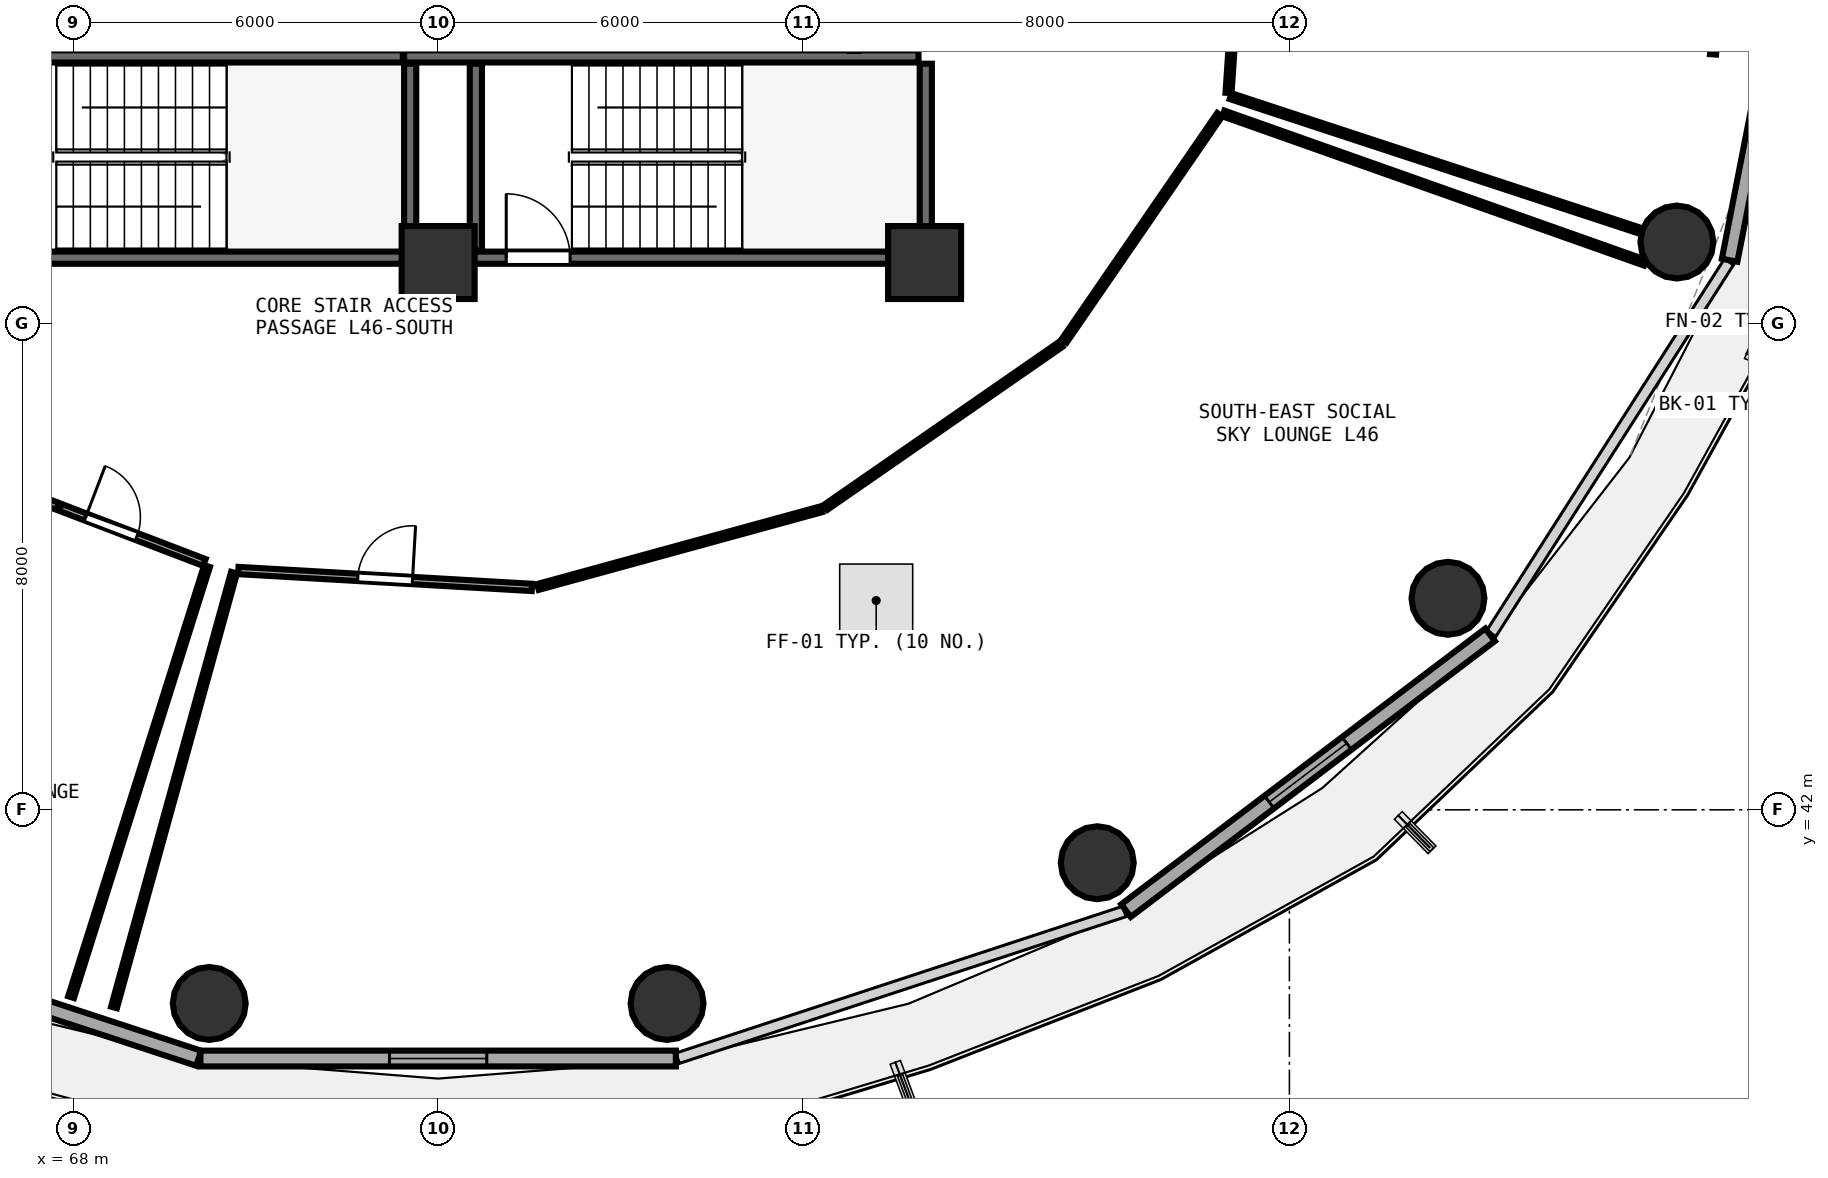
"""IFC4 building model, lengths in metres.
Left out: names, types, materials, properties, quantities, classifications, styles, units other than length and angle.
Written with IfcOpenShell. Run it as: python <this file> out.ifc"""

import sys

from ifc_helpers import new_model, si_unit, direction, frame, frame_2d, origin, origin_2d, place, context, subcontext, project, spatial, rectangle, circle, extrude, element, fill, save


model = new_model("IFC4")
c1 = context("Model", 3, precision=1e-05, world=origin(), true_north=direction((0.0, 1.0)))
c2 = subcontext(c1, "Body", "Model", "MODEL_VIEW")
j1 = project(units=[si_unit("LENGTHUNIT", "METRE"), si_unit("PLANEANGLEUNIT", "RADIAN")], contexts=[c1])
p1 = place(None, origin())
s1 = spatial("IfcSite", under=j1, at=p1, CompositionType="ELEMENT")
p2 = place(p1, origin())
s2 = spatial("IfcBuilding", under=s1, at=p2, CompositionType="ELEMENT")
p3 = place(p2, frame((0.0, 0.0, 180.6)))
s3 = spatial("IfcBuildingStorey", under=s2, at=p3, CompositionType="ELEMENT", Elevation=180.6)
for number, where, z_axis, x_axis in (
    (1, (74.0, 51.0, 0.0), (0.0, 0.0, 1.0), (1.0, 0.0, 0.0)),
    (2, (82.0, 51.0, 0.0), (0.0, 0.0, 1.0), (1.0, 0.0, 0.0)),
):
    element("IfcColumn", number, at=place(p3, frame(where, z_axis=z_axis, x_axis=x_axis)), inside=s3, PredefinedType="PILASTER", context=c2, shape_type="SweptSolid", body=[
        extrude(rectangle(XDim=1.2, YDim=1.2, at=origin_2d()), origin(), (0.0, 0.0, 1.0), 3.75),
    ])
for number, where, z_axis, x_axis in (
    (3, (70.235, 38.816, 0.0), (0.0, 0.0, 1.0), (1.0, 0.0, 0.0)),
    (4, (77.765, 38.816, 0.0), (0.0, 0.0, 1.0), (1.0, 0.0, 0.0)),
    (5, (84.84, 41.13, 0.0), (0.0, 0.0, 1.0), (1.0, 0.0, 0.0)),
    (6, (90.608, 45.479, 0.0), (0.0, 0.0, 1.0), (1.0, 0.0, 0.0)),
    (7, (94.373, 51.337, 0.0), (0.0, 0.0, 1.0), (1.0, 0.0, 0.0)),
):
    element("IfcColumn", number, at=place(p3, frame(where, z_axis=z_axis, x_axis=x_axis)), inside=s3, PredefinedType="COLUMN", context=c2, shape_type="SweptSolid", body=[
        extrude(circle(Radius=0.6, at=origin_2d()), origin(), (0.0, 0.0, 1.0), 3.75),
    ])
p4 = place(p3, frame((62.714, 40.328, 0.0), z_axis=(0.0, 0.0, 1.0), x_axis=(0.950038302428, -0.312133343173, 0.0)))
e8 = element("IfcWall", 8, at=p4, inside=s3, PredefinedType="SOLIDWALL", context=c2, shape_type="SweptSolid", body=[
    extrude(rectangle(XDim=7.733, YDim=0.26, at=frame_2d((3.867, 0.0))), origin(), (0.0, 0.0, 1.0), 3.475),
])
p5 = place(p4, frame((3.067, 0.0, 0.85)))
e9 = element("IfcOpeningElement", 9, at=p5, cuts=e8, PredefinedType="OPENING", context=c2, shape_type="SweptSolid", body=[
    extrude(rectangle(XDim=1.6, YDim=1.45, at=frame_2d((0.8, 0.725))), frame((0.0, 0.14, 0.0), z_axis=(0.0, -1.0, 0.0), x_axis=(1.0, 0.0, 0.0)), (0.0, 0.0, 1.0), 0.28),
])
p6 = place(p3, frame((70.091, 37.91, 0.0), z_axis=(0.0, 0.0, 1.0), x_axis=(1.0, 0.0, 0.0)))
e10 = element("IfcWall", 10, at=p6, inside=s3, PredefinedType="SOLIDWALL", context=c2, shape_type="SweptSolid", body=[
    extrude(rectangle(XDim=7.819, YDim=0.26, at=frame_2d((3.909, 0.0))), origin(), (0.0, 0.0, 1.0), 3.475),
])
p7 = place(p6, frame((3.109, 0.0, 0.85)))
e11 = element("IfcOpeningElement", 11, at=p7, cuts=e10, PredefinedType="OPENING", context=c2, shape_type="SweptSolid", body=[
    extrude(rectangle(XDim=1.6, YDim=1.45, at=frame_2d((0.8, 0.725))), frame((0.0, 0.14, 0.0), z_axis=(0.0, -1.0, 0.0), x_axis=(1.0, 0.0, 0.0)), (0.0, 0.0, 1.0), 0.28),
])
p8 = place(p3, frame((85.312, 40.342, 0.0), z_axis=(0.0, 0.0, 1.0), x_axis=(0.797163719609, 0.603763202042, 0.0)))
e12 = element("IfcWall", 12, at=p8, inside=s3, PredefinedType="SOLIDWALL", context=c2, shape_type="SweptSolid", body=[
    extrude(rectangle(XDim=7.512, YDim=0.26, at=frame_2d((3.756, 0.0))), origin(), (0.0, 0.0, 1.0), 3.475),
])
p9 = place(p8, frame((2.956, 0.0, 0.85)))
e13 = element("IfcOpeningElement", 13, at=p9, cuts=e12, PredefinedType="OPENING", context=c2, shape_type="SweptSolid", body=[
    extrude(rectangle(XDim=1.6, YDim=1.45, at=frame_2d((0.8, 0.725))), frame((0.0, 0.14, 0.0), z_axis=(0.0, -1.0, 0.0), x_axis=(1.0, 0.0, 0.0)), (0.0, 0.0, 1.0), 0.28),
])
p10 = place(p3, frame((95.24, 51.038, 0.0), z_axis=(0.0, 0.0, 1.0), x_axis=(0.191716984769, 0.981450252306, 0.0)))
e14 = element("IfcWall", 14, at=p10, inside=s3, PredefinedType="SOLIDWALL", context=c2, shape_type="SweptSolid", body=[
    extrude(rectangle(XDim=7.079, YDim=0.26, at=frame_2d((3.54, 0.0))), origin(), (0.0, 0.0, 1.0), 3.475),
])
p11 = place(p10, frame((2.74, 0.0, 0.85)))
e15 = element("IfcOpeningElement", 15, at=p11, cuts=e14, PredefinedType="OPENING", context=c2, shape_type="SweptSolid", body=[
    extrude(rectangle(XDim=1.6, YDim=1.45, at=frame_2d((0.8, 0.725))), frame((0.0, 0.14, 0.0), z_axis=(0.0, -1.0, 0.0), x_axis=(1.0, 0.0, 0.0)), (0.0, 0.0, 1.0), 0.28),
])
p12 = place(p3, frame((74.0, 51.08, 0.0), z_axis=(0.0, 0.0, 1.0), x_axis=(1.0, 0.0, 0.0)))
e16 = element("IfcWall", 16, at=p12, inside=s3, PredefinedType="SHEAR", context=c2, shape_type="SweptSolid", body=[
    extrude(rectangle(XDim=7.9, YDim=0.2, at=frame_2d((3.95, 0.0))), origin(), (0.0, 0.0, 1.0), 3.49),
])
p13 = place(p12, frame((1.12, 0.0, 0.0)))
e17 = element("IfcOpeningElement", 17, at=p13, cuts=e16, PredefinedType="OPENING", context=c2, shape_type="SweptSolid", body=[
    extrude(rectangle(XDim=1.05, YDim=2.1, at=frame_2d((0.525, 1.05))), frame((0.0, 0.11, 0.0), z_axis=(0.0, -1.0, 0.0), x_axis=(1.0, 0.0, 0.0)), (0.0, 0.0, 1.0), 0.22),
])
p14 = place(p3, frame((82.02, 51.2, 0.0), z_axis=(0.0, 0.0, 1.0), x_axis=(0.0, 1.0, 0.0)))
e18 = element("IfcWall", 18, at=p14, inside=s3, PredefinedType="SHEAR", context=c2, shape_type="SweptSolid", body=[
    extrude(rectangle(XDim=3.07, YDim=0.2, at=frame_2d((1.535, 0.0))), origin(), (0.0, 0.0, 1.0), 3.49),
])
p15 = place(p3, frame((81.9, 54.39, 0.0), z_axis=(0.0, 0.0, 1.0), x_axis=(-1.0, 0.0, 0.0)))
e19 = element("IfcWall", 19, at=p15, inside=s3, PredefinedType="SHEAR", context=c2, shape_type="SweptSolid", body=[
    extrude(rectangle(XDim=8.46, YDim=0.2, at=frame_2d((4.23, 0.0))), origin(), (0.0, 0.0, 1.0), 3.49),
])
p16 = place(p3, frame((74.62, 54.27, 0.0), z_axis=(0.0, 0.0, 1.0), x_axis=(0.0, -1.0, 0.0)))
e20 = element("IfcWall", 20, at=p16, inside=s3, PredefinedType="SHEAR", context=c2, shape_type="SweptSolid", body=[
    extrude(rectangle(XDim=3.07, YDim=0.2, at=frame_2d((1.535, 0.0))), origin(), (0.0, 0.0, 1.0), 3.49),
])
p17 = place(p3, frame((66.26, 51.08, 0.0), z_axis=(0.0, 0.0, 1.0), x_axis=(1.0, 0.0, 0.0)))
e21 = element("IfcWall", 21, at=p17, inside=s3, PredefinedType="SHEAR", context=c2, shape_type="SweptSolid", body=[
    extrude(rectangle(XDim=7.16, YDim=0.2, at=frame_2d((3.58, 0.0))), origin(), (0.0, 0.0, 1.0), 3.49),
])
p18 = place(p3, frame((73.54, 51.2, 0.0), z_axis=(0.0, 0.0, 1.0), x_axis=(0.0, 1.0, 0.0)))
e22 = element("IfcWall", 22, at=p18, inside=s3, PredefinedType="SHEAR", context=c2, shape_type="SweptSolid", body=[
    extrude(rectangle(XDim=3.07, YDim=0.2, at=frame_2d((1.535, 0.0))), origin(), (0.0, 0.0, 1.0), 3.49),
])
p19 = place(p3, frame((73.42, 54.39, 0.0), z_axis=(0.0, 0.0, 1.0), x_axis=(-1.0, 0.0, 0.0)))
e23 = element("IfcWall", 23, at=p19, inside=s3, PredefinedType="SHEAR", context=c2, shape_type="SweptSolid", body=[
    extrude(rectangle(XDim=7.16, YDim=0.2, at=frame_2d((3.58, 0.0))), origin(), (0.0, 0.0, 1.0), 3.49),
])
p20 = place(p3, frame((70.714, 45.936, 0.0), z_axis=(0.0, 0.0, 1.0), x_axis=(0.998345519296, -0.057499774802, 0.0)))
e24 = element("IfcWall", 24, at=p20, inside=s3, PredefinedType="PARTITIONING", context=c2, shape_type="SweptSolid", body=[
    extrude(rectangle(XDim=4.836, YDim=0.12, at=frame_2d((2.418, 0.0))), origin(), (0.0, 0.0, 1.0), 2.975),
])
p21 = place(p20, frame((1.968, 0.0, 0.0)))
e25 = element("IfcOpeningElement", 25, at=p21, cuts=e24, PredefinedType="OPENING", context=c2, shape_type="SweptSolid", body=[
    extrude(rectangle(XDim=0.9, YDim=2.08, at=frame_2d((0.45, 1.04))), frame((0.0, 0.07, 0.0), z_axis=(0.0, -1.0, 0.0), x_axis=(1.0, 0.0, 0.0)), (0.0, 0.0, 1.0), 0.14),
])
p22 = place(p3, frame((67.092, 47.24, 0.0), z_axis=(0.0, 0.0, 1.0), x_axis=(0.93395246748, -0.35739724186, 0.0)))
e26 = element("IfcWall", 26, at=p22, inside=s3, PredefinedType="PARTITIONING", context=c2, shape_type="SweptSolid", body=[
    extrude(rectangle(XDim=3.28, YDim=0.12, at=frame_2d((1.64, 0.0))), origin(), (0.0, 0.0, 1.0), 3.235),
])
p23 = place(p22, frame((1.19, 0.0, 0.0)))
e27 = element("IfcOpeningElement", 27, at=p23, cuts=e26, PredefinedType="OPENING", context=c2, shape_type="SweptSolid", body=[
    extrude(rectangle(XDim=0.9, YDim=2.08, at=frame_2d((0.45, 1.04))), frame((0.0, 0.07, 0.0), z_axis=(0.0, -1.0, 0.0), x_axis=(1.0, 0.0, 0.0)), (0.0, 0.0, 1.0), 0.14),
])
p24 = place(p3, frame((75.641, 45.665, 0.0), z_axis=(0.0, 0.0, 1.0), x_axis=(0.964402925862, 0.264437131637, 0.0)))
e28 = element("IfcWall", 28, at=p24, inside=s3, PredefinedType="PARTITIONING", context=c2, shape_type="SweptSolid", body=[
    extrude(rectangle(XDim=4.836, YDim=0.1, at=frame_2d((2.418, 0.0))), origin(), (0.0, 0.0, 1.0), 2.975),
])
p25 = place(p3, frame((80.376, 46.977, 0.0), z_axis=(0.0, 0.0, 1.0), x_axis=(0.821969471946, 0.569531550653, 0.0)))
e29 = element("IfcWall", 29, at=p25, inside=s3, PredefinedType="PARTITIONING", context=c2, shape_type="SweptSolid", body=[
    extrude(rectangle(XDim=4.697, YDim=0.1, at=frame_2d((2.349, 0.0))), origin(), (0.0, 0.0, 1.0), 2.975),
])
p26 = place(p3, frame((84.293, 49.708, 0.0), z_axis=(0.0, 0.0, 1.0), x_axis=(0.566732833033, 0.823901630028, 0.0)))
e30 = element("IfcWall", 30, at=p26, inside=s3, PredefinedType="PARTITIONING", context=c2, shape_type="SweptSolid", body=[
    extrude(rectangle(XDim=4.52, YDim=0.1, at=frame_2d((2.26, 0.0))), origin(), (0.0, 0.0, 1.0), 2.975),
])
p27 = place(p3, frame((86.915, 53.452, 0.0), z_axis=(0.0, 0.0, 1.0), x_axis=(0.942679225918, -0.333700280226, 0.0)))
e31 = element("IfcWall", 31, at=p27, inside=s3, PredefinedType="PARTITIONING", context=c2, shape_type="SweptSolid", body=[
    extrude(rectangle(XDim=7.355, YDim=0.1, at=frame_2d((3.677, 0.0))), origin(), (0.0, 0.0, 1.0), 2.975),
])
p28 = place(p3, frame((68.669, 38.75, 0.0), z_axis=(0.0, 0.0, 1.0), x_axis=(0.26617364863, 0.963925095002, 0.0)))
e32 = element("IfcWall", 32, at=p28, inside=s3, PredefinedType="PARTITIONING", context=c2, shape_type="SweptSolid", body=[
    extrude(rectangle(XDim=7.418, YDim=0.1, at=frame_2d((3.709, 0.0))), origin(), (0.0, 0.0, 1.0), 3.025),
])
p29 = place(p3, frame((86.999, 53.789, 0.0), z_axis=(0.0, 0.0, 1.0), x_axis=(0.06796220027, 0.997687896757, 0.0)))
e33 = element("IfcWall", 33, at=p29, inside=s3, PredefinedType="PARTITIONING", context=c2, shape_type="SweptSolid", body=[
    extrude(rectangle(XDim=6.983, YDim=0.1, at=frame_2d((3.492, 0.0))), origin(), (0.0, 0.0, 1.0), 2.975),
])
p30 = place(p3, frame((95.184, 57.619, 0.0), z_axis=(0.0, 0.0, 1.0), x_axis=(-0.06775835494, -0.997701761718, 0.0)))
e34 = element("IfcWall", 34, at=p30, inside=s3, PredefinedType="PARTITIONING", context=c2, shape_type="SweptSolid", body=[
    extrude(rectangle(XDim=3.203, YDim=0.1, at=frame_2d((1.602, 0.0))), origin(), (0.0, 0.0, 1.0), 3.025),
])
p31 = place(p3, frame((93.775, 51.521, 0.0), z_axis=(0.0, 0.0, 1.0), x_axis=(-0.949992823036, 0.312271734521, 0.0)))
e35 = element("IfcWall", 35, at=p31, inside=s3, PredefinedType="PARTITIONING", context=c2, shape_type="SweptSolid", body=[
    extrude(rectangle(XDim=7.096, YDim=0.1, at=frame_2d((3.548, 0.0))), origin(), (0.0, 0.0, 1.0), 3.175),
])
p32 = place(p3, frame((70.199, 46.008, 0.0), z_axis=(0.0, 0.0, 1.0), x_axis=(-0.300834252316, -0.953676440222, 0.0)))
e36 = element("IfcWall", 36, at=p32, inside=s3, PredefinedType="PARTITIONING", context=c2, shape_type="SweptSolid", body=[
    extrude(rectangle(XDim=7.433, YDim=0.1, at=frame_2d((3.716, 0.0))), origin(), (0.0, 0.0, 1.0), 3.025),
])
p33 = place(p7, origin())
e37 = element("IfcWindow", 37, at=p33, inside=s3, PartitioningType="SINGLE_PANEL", PredefinedType="WINDOW", context=c2, shape_type="SweptSolid", body=[
    extrude(rectangle(XDim=1.6, YDim=1.45, at=frame_2d((0.8, 0.725))), frame((0.0, 0.03, 0.0), z_axis=(0.0, -1.0, 0.0), x_axis=(1.0, 0.0, 0.0)), (0.0, 0.0, 1.0), 0.06),
])
fill(e11, e37)
p34 = place(p9, origin())
e38 = element("IfcWindow", 38, at=p34, inside=s3, PartitioningType="SINGLE_PANEL", PredefinedType="WINDOW", context=c2, shape_type="SweptSolid", body=[
    extrude(rectangle(XDim=1.6, YDim=1.45, at=frame_2d((0.8, 0.725))), frame((0.0, 0.03, 0.0), z_axis=(0.0, -1.0, 0.0), x_axis=(1.0, 0.0, 0.0)), (0.0, 0.0, 1.0), 0.06),
])
fill(e13, e38)
p35 = place(p13, origin())
e39 = element("IfcDoor", 39, at=p35, inside=s3, OperationType="SINGLE_SWING_LEFT", PredefinedType="DOOR", context=c2, shape_type="SweptSolid", body=[
    extrude(rectangle(XDim=1.05, YDim=2.1, at=frame_2d((0.525, 1.05))), frame((0.0, 0.025, 0.0), z_axis=(0.0, -1.0, 0.0), x_axis=(1.0, 0.0, 0.0)), (0.0, 0.0, 1.0), 0.05),
])
fill(e17, e39)
p36 = place(p21, origin())
e40 = element("IfcDoor", 40, at=p36, inside=s3, OperationType="SINGLE_SWING_RIGHT", PredefinedType="DOOR", context=c2, shape_type="SweptSolid", body=[
    extrude(rectangle(XDim=0.9, YDim=2.08, at=frame_2d((0.45, 1.04))), frame((0.0, 0.025, 0.0), z_axis=(0.0, -1.0, 0.0), x_axis=(1.0, 0.0, 0.0)), (0.0, 0.0, 1.0), 0.05),
])
fill(e25, e40)
p37 = place(p23, origin())
e41 = element("IfcDoor", 41, at=p37, inside=s3, OperationType="SINGLE_SWING_LEFT", PredefinedType="DOOR", context=c2, shape_type="SweptSolid", body=[
    extrude(rectangle(XDim=0.9, YDim=2.08, at=frame_2d((0.45, 1.04))), frame((0.0, 0.025, 0.0), z_axis=(0.0, -1.0, 0.0), x_axis=(1.0, 0.0, 0.0)), (0.0, 0.0, 1.0), 0.05),
])
fill(e27, e41)
save(model, sys.argv[1])
